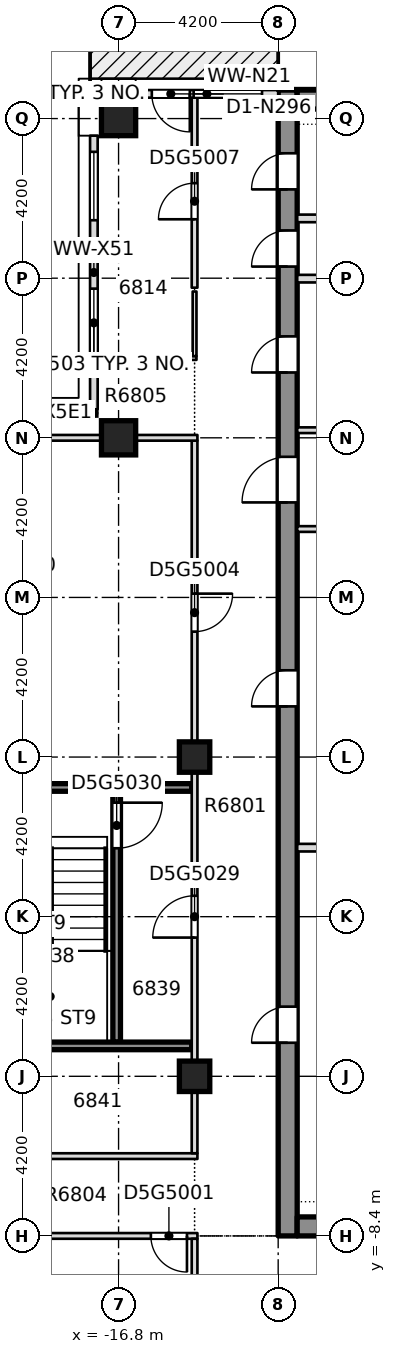
"""IFC4 building model, lengths in metres.
Left out: names, types, materials, properties, quantities, classifications, styles, units other than length and angle.
Written with IfcOpenShell. Run it as: python <this file> out.ifc"""

import sys

from ifc_helpers import new_model, si_unit, direction, frame, frame_2d, origin, origin_2d, place, context, subcontext, project, spatial, rectangle, extrude, element, fill, save


model = new_model("IFC4")
c1 = context("Model", 3, precision=1e-05, world=origin(), true_north=direction((0.0, 1.0)))
c2 = subcontext(c1, "Body", "Model", "MODEL_VIEW")
j1 = project(units=[si_unit("LENGTHUNIT", "METRE"), si_unit("PLANEANGLEUNIT", "RADIAN")], contexts=[c1])
p1 = place(None, origin())
s1 = spatial("IfcSite", under=j1, at=p1, CompositionType="ELEMENT")
p2 = place(p1, origin())
s2 = spatial("IfcBuilding", under=s1, at=p2, CompositionType="ELEMENT")
p3 = place(p2, frame((0.0, 0.0, 257.95)))
s3 = spatial("IfcBuildingStorey", under=s2, at=p3, CompositionType="ELEMENT", Elevation=257.95)
p4 = place(p3, frame((-12.35, -8.4, -0.4), z_axis=(0.0, 0.0, 1.0), x_axis=(0.0, 1.0, 0.0)))
e1 = element("IfcWall", 1, at=p4, inside=s3, PredefinedType="SHEAR", context=c2, shape_type="SweptSolid", body=[
    extrude(rectangle(XDim=30.15, YDim=0.5, at=frame_2d((15.075, 0.0))), origin(), (0.0, 0.0, 1.0), 3.45),
])
p5 = place(p4, frame((5.083, 0.0, 0.4)))
e2 = element("IfcOpeningElement", 2, at=p5, cuts=e1, PredefinedType="OPENING", context=c2, shape_type="SweptSolid", body=[
    extrude(rectangle(XDim=0.95, YDim=2.1, at=frame_2d((0.475, 1.05))), frame((0.0, 0.26, 0.0), z_axis=(0.0, -1.0, 0.0), x_axis=(1.0, 0.0, 0.0)), (0.0, 0.0, 1.0), 0.52),
])
p6 = place(p4, frame((13.933, 0.0, 0.4)))
e3 = element("IfcOpeningElement", 3, at=p6, cuts=e1, PredefinedType="OPENING", context=c2, shape_type="SweptSolid", body=[
    extrude(rectangle(XDim=0.95, YDim=2.1, at=frame_2d((0.475, 1.05))), frame((0.0, 0.26, 0.0), z_axis=(0.0, -1.0, 0.0), x_axis=(1.0, 0.0, 0.0)), (0.0, 0.0, 1.0), 0.52),
])
p7 = place(p4, frame((22.719, 0.0, 0.4)))
e4 = element("IfcOpeningElement", 4, at=p7, cuts=e1, PredefinedType="OPENING", context=c2, shape_type="SweptSolid", body=[
    extrude(rectangle(XDim=0.95, YDim=2.1, at=frame_2d((0.475, 1.05))), frame((0.0, 0.26, 0.0), z_axis=(0.0, -1.0, 0.0), x_axis=(1.0, 0.0, 0.0)), (0.0, 0.0, 1.0), 0.52),
])
p8 = place(p4, frame((25.506, 0.0, 0.4)))
e5 = element("IfcOpeningElement", 5, at=p8, cuts=e1, PredefinedType="OPENING", context=c2, shape_type="SweptSolid", body=[
    extrude(rectangle(XDim=0.95, YDim=2.1, at=frame_2d((0.475, 1.05))), frame((0.0, 0.26, 0.0), z_axis=(0.0, -1.0, 0.0), x_axis=(1.0, 0.0, 0.0)), (0.0, 0.0, 1.0), 0.52),
])
p9 = place(p4, frame((27.537, 0.0, 0.4)))
e6 = element("IfcOpeningElement", 6, at=p9, cuts=e1, PredefinedType="OPENING", context=c2, shape_type="SweptSolid", body=[
    extrude(rectangle(XDim=0.95, YDim=2.1, at=frame_2d((0.475, 1.05))), frame((0.0, 0.26, 0.0), z_axis=(0.0, -1.0, 0.0), x_axis=(1.0, 0.0, 0.0)), (0.0, 0.0, 1.0), 0.52),
])
p10 = place(p4, frame((19.3, 0.0, 0.4)))
e7 = element("IfcOpeningElement", 7, at=p10, cuts=e1, PredefinedType="OPENING", context=c2, shape_type="SweptSolid", body=[
    extrude(rectangle(XDim=1.2, YDim=2.1, at=frame_2d((0.6, 1.05))), frame((0.0, 0.26, 0.0), z_axis=(0.0, -1.0, 0.0), x_axis=(1.0, 0.0, 0.0)), (0.0, 0.0, 1.0), 0.52),
])
p11 = place(p3, frame((-12.1, -8.15, -0.4), z_axis=(0.0, 0.0, 1.0), x_axis=(1.0, 0.0, 0.0)))
e8 = element("IfcWall", 8, at=p11, inside=s3, PredefinedType="SHEAR", context=c2, shape_type="SweptSolid", body=[
    extrude(rectangle(XDim=24.2, YDim=0.5, at=frame_2d((12.1, 0.0))), origin(), (0.0, 0.0, 1.0), 3.45),
])
p12 = place(p11, frame((7.35, 0.0, 0.4)))
e9 = element("IfcOpeningElement", 9, at=p12, cuts=e8, PredefinedType="OPENING", context=c2, shape_type="SweptSolid", body=[
    extrude(rectangle(XDim=1.8, YDim=2.1, at=frame_2d((0.9, 1.05))), frame((0.0, 0.26, 0.0), z_axis=(0.0, -1.0, 0.0), x_axis=(1.0, 0.0, 0.0)), (0.0, 0.0, 1.0), 0.52),
])
p13 = place(p11, frame((15.05, 0.0, 0.4)))
e10 = element("IfcOpeningElement", 10, at=p13, cuts=e8, PredefinedType="OPENING", context=c2, shape_type="SweptSolid", body=[
    extrude(rectangle(XDim=1.8, YDim=2.1, at=frame_2d((0.9, 1.05))), frame((0.0, 0.26, 0.0), z_axis=(0.0, -1.0, 0.0), x_axis=(1.0, 0.0, 0.0)), (0.0, 0.0, 1.0), 0.52),
])
p14 = place(p3, frame((-12.1, 21.5, -0.4), z_axis=(0.0, 0.0, 1.0), x_axis=(1.0, 0.0, 0.0)))
e11 = element("IfcWall", 11, at=p14, inside=s3, PredefinedType="SHEAR", context=c2, shape_type="SweptSolid", body=[
    extrude(rectangle(XDim=24.2, YDim=0.5, at=frame_2d((12.1, 0.0))), origin(), (0.0, 0.0, 1.0), 3.45),
])
for number, where, z_axis, x_axis in (
    (12, (-16.8, 12.6, -0.4), (0.0, 0.0, 1.0), (1.0, 0.0, 0.0)),
    (13, (-16.8, 21.0, -0.4), (0.0, 0.0, 1.0), (1.0, 0.0, 0.0)),
):
    element("IfcColumn", number, at=place(p3, frame(where, z_axis=z_axis, x_axis=x_axis)), inside=s3, PredefinedType="COLUMN", context=c2, shape_type="SweptSolid", body=[
        extrude(rectangle(XDim=0.9, YDim=0.9, at=origin_2d()), origin(), (0.0, 0.0, 1.0), 3.45),
    ])
for number, where, z_axis, x_axis in (
    (14, (-14.8, -4.2, -0.4), (0.0, 0.0, 1.0), (1.0, 0.0, 0.0)),
    (15, (-14.8, 4.2, -0.4), (0.0, 0.0, 1.0), (1.0, 0.0, 0.0)),
):
    element("IfcColumn", number, at=place(p3, frame(where, z_axis=z_axis, x_axis=x_axis)), inside=s3, PredefinedType="COLUMN", context=c2, shape_type="SweptSolid", body=[
        extrude(rectangle(XDim=0.8, YDim=0.8, at=origin_2d()), origin(), (0.0, 0.0, 1.0), 3.45),
    ])
p15 = place(p3, frame((-25.75, -8.4, 0.0), z_axis=(0.0, 0.0, 1.0), x_axis=(1.0, 0.0, 0.0)))
e16 = element("IfcWall", 16, at=p15, inside=s3, PredefinedType="PARTITIONING", context=c2, shape_type="SweptSolid", body=[
    extrude(rectangle(XDim=11.025, YDim=0.15, at=frame_2d((5.512, 0.0))), origin(), (0.0, 0.0, 1.0), 3.05),
])
p16 = place(p15, frame((9.8, 0.0, 0.0)))
e17 = element("IfcOpeningElement", 17, at=p16, cuts=e16, PredefinedType="OPENING", context=c2, shape_type="SweptSolid", body=[
    extrude(rectangle(XDim=0.95, YDim=2.1, at=frame_2d((0.475, 1.05))), frame((0.0, 0.085, 0.0), z_axis=(0.0, -1.0, 0.0), x_axis=(1.0, 0.0, 0.0)), (0.0, 0.0, 1.0), 0.17),
])
p17 = place(p3, frame((-25.75, -6.3, 0.0), z_axis=(0.0, 0.0, 1.0), x_axis=(1.0, 0.0, 0.0)))
e18 = element("IfcWall", 18, at=p17, inside=s3, PredefinedType="PARTITIONING", context=c2, shape_type="SweptSolid", body=[
    extrude(rectangle(XDim=11.025, YDim=0.15, at=frame_2d((5.512, 0.0))), origin(), (0.0, 0.0, 1.0), 3.05),
])
p18 = place(p17, frame((4.875, 0.0, 0.0)))
e19 = element("IfcOpeningElement", 19, at=p18, cuts=e18, PredefinedType="OPENING", context=c2, shape_type="SweptSolid", body=[
    extrude(rectangle(XDim=1.0, YDim=2.1, at=frame_2d((0.5, 1.05))), frame((0.0, 0.085, 0.0), z_axis=(0.0, -1.0, 0.0), x_axis=(1.0, 0.0, 0.0)), (0.0, 0.0, 1.0), 0.17),
])
p19 = place(p3, frame((-20.45, 3.4, 0.0), z_axis=(0.0, 0.0, 1.0), x_axis=(1.0, 0.0, 0.0)))
e20 = element("IfcWall", 20, at=p19, inside=s3, PredefinedType="SOLIDWALL", context=c2, shape_type="SweptSolid", body=[
    extrude(rectangle(XDim=5.575, YDim=0.2, at=frame_2d((2.788, 0.0))), origin(), (0.0, 0.0, 1.0), 3.05),
])
p20 = place(p3, frame((-17.35, 14.7, 0.0), z_axis=(0.0, 0.0, 1.0), x_axis=(1.0, 0.0, 0.0)))
e21 = element("IfcWall", 21, at=p20, inside=s3, PredefinedType="PARTITIONING", context=c2, shape_type="SweptSolid", body=[
    extrude(rectangle(XDim=0.2, YDim=0.15, at=frame_2d((0.1, 0.0))), origin(), (0.0, 0.0, 1.0), 3.05),
])
p21 = place(p3, frame((-17.25, 14.7, 0.0), z_axis=(0.0, 0.0, 1.0), x_axis=(1.0, 0.0, 0.0)))
e22 = element("IfcWall", 22, at=p21, inside=s3, PredefinedType="PARTITIONING", context=c2, shape_type="SweptSolid", body=[
    extrude(rectangle(XDim=2.5, YDim=0.1, at=frame_2d((1.25, 0.0))), origin(), (0.0, 0.0, 1.0), 3.05),
])
p22 = place(p3, frame((-16.85, -3.3, 0.0), z_axis=(0.0, 0.0, 1.0), x_axis=(0.0, 1.0, 0.0)))
e23 = element("IfcWall", 23, at=p22, inside=s3, PredefinedType="SOLIDWALL", context=c2, shape_type="SweptSolid", body=[
    extrude(rectangle(XDim=6.6, YDim=0.2, at=frame_2d((3.3, 0.0))), origin(), (0.0, 0.0, 1.0), 3.05),
])
p23 = place(p22, frame((5.1, 0.0, 0.0)))
e24 = element("IfcOpeningElement", 24, at=p23, cuts=e23, PredefinedType="OPENING", context=c2, shape_type="SweptSolid", body=[
    extrude(rectangle(XDim=1.2, YDim=2.1, at=frame_2d((0.6, 1.05))), frame((0.0, 0.11, 0.0), z_axis=(0.0, -1.0, 0.0), x_axis=(1.0, 0.0, 0.0)), (0.0, 0.0, 1.0), 0.22),
])
p24 = place(p3, frame((-14.8, -10.38, 0.0), z_axis=(0.0, 0.0, 1.0), x_axis=(0.0, 1.0, 0.0)))
e25 = element("IfcWall", 25, at=p24, inside=s3, PredefinedType="PARTITIONING", context=c2, shape_type="SweptSolid", body=[
    extrude(rectangle(XDim=1.905, YDim=0.15, at=frame_2d((0.952, 0.0))), origin(), (0.0, 0.0, 1.0), 3.05),
])
p25 = place(p3, frame((-14.8, -6.225, 0.0), z_axis=(0.0, 0.0, 1.0), x_axis=(0.0, 1.0, 0.0)))
e26 = element("IfcWall", 26, at=p25, inside=s3, PredefinedType="PARTITIONING", context=c2, shape_type="SweptSolid", body=[
    extrude(rectangle(XDim=18.75, YDim=0.15, at=frame_2d((9.375, 0.0))), origin(), (0.0, 0.0, 1.0), 3.05),
])
p26 = place(p25, frame((13.725, 0.0, 0.0)))
e27 = element("IfcOpeningElement", 27, at=p26, cuts=e26, PredefinedType="OPENING", context=c2, shape_type="SweptSolid", body=[
    extrude(rectangle(XDim=1.0, YDim=2.1, at=frame_2d((0.5, 1.05))), frame((0.0, 0.085, 0.0), z_axis=(0.0, -1.0, 0.0), x_axis=(1.0, 0.0, 0.0)), (0.0, 0.0, 1.0), 0.17),
])
p27 = place(p25, frame((5.675, 0.0, 0.0)))
e28 = element("IfcOpeningElement", 28, at=p27, cuts=e26, PredefinedType="OPENING", context=c2, shape_type="SweptSolid", body=[
    extrude(rectangle(XDim=1.1, YDim=2.1, at=frame_2d((0.55, 1.05))), frame((0.0, 0.085, 0.0), z_axis=(0.0, -1.0, 0.0), x_axis=(1.0, 0.0, 0.0)), (0.0, 0.0, 1.0), 0.17),
])
p28 = place(p3, frame((-14.8, 14.75, 0.0), z_axis=(0.0, 0.0, 1.0), x_axis=(0.0, 1.0, 0.0)))
e29 = element("IfcWall", 29, at=p28, inside=s3, PredefinedType="PARTITIONING", context=c2, shape_type="SweptSolid", body=[
    extrude(rectangle(XDim=1.7, YDim=0.1, at=frame_2d((0.85, 0.0))), origin(), (0.0, 0.0, 1.0), 3.05),
])
p29 = place(p3, frame((-14.8, 16.55, 0.0), z_axis=(0.0, 0.0, 1.0), x_axis=(0.0, 1.0, 0.0)))
e30 = element("IfcWall", 30, at=p29, inside=s3, PredefinedType="PARTITIONING", context=c2, shape_type="SweptSolid", body=[
    extrude(rectangle(XDim=5.0, YDim=0.15, at=frame_2d((2.5, 0.0))), origin(), (0.0, 0.0, 1.0), 3.05),
])
p30 = place(p29, frame((1.8, 0.0, 0.0)))
e31 = element("IfcOpeningElement", 31, at=p30, cuts=e30, PredefinedType="OPENING", context=c2, shape_type="SweptSolid", body=[
    extrude(rectangle(XDim=0.95, YDim=2.1, at=frame_2d((0.475, 1.05))), frame((0.0, 0.085, 0.0), z_axis=(0.0, -1.0, 0.0), x_axis=(1.0, 0.0, 0.0)), (0.0, 0.0, 1.0), 0.17),
])
p31 = place(p3, frame((-12.6, 21.65, 0.0), z_axis=(0.0, 0.0, 1.0), x_axis=(-1.0, 0.0, 0.0)))
e32 = element("IfcWall", 32, at=p31, inside=s3, PredefinedType="STANDARD", context=c2, shape_type="SweptSolid", body=[
    extrude(rectangle(XDim=3.75, YDim=0.2, at=frame_2d((1.875, 0.0))), origin(), (0.0, 0.0, 1.0), 3.05),
])
p32 = place(p31, frame((0.425, 0.0, 0.2)))
e33 = element("IfcOpeningElement", 33, at=p32, cuts=e32, PredefinedType="OPENING", context=c2, shape_type="SweptSolid", body=[
    extrude(rectangle(XDim=1.8, YDim=2.65, at=frame_2d((0.9, 1.325))), frame((0.0, 0.11, 0.0), z_axis=(0.0, -1.0, 0.0), x_axis=(1.0, 0.0, 0.0)), (0.0, 0.0, 1.0), 0.22),
])
p33 = place(p31, frame((2.325, 0.0, 0.0)))
e34 = element("IfcOpeningElement", 34, at=p33, cuts=e32, PredefinedType="OPENING", context=c2, shape_type="SweptSolid", body=[
    extrude(rectangle(XDim=1.0, YDim=2.4, at=frame_2d((0.5, 1.2))), frame((0.0, 0.11, 0.0), z_axis=(0.0, -1.0, 0.0), x_axis=(1.0, 0.0, 0.0)), (0.0, 0.0, 1.0), 0.22),
])
p34 = place(p3, frame((-17.45, 20.55, 0.0), z_axis=(0.0, 0.0, 1.0), x_axis=(0.0, -1.0, 0.0)))
e35 = element("IfcWall", 35, at=p34, inside=s3, PredefinedType="STANDARD", context=c2, shape_type="SweptSolid", body=[
    extrude(rectangle(XDim=7.2, YDim=0.2, at=frame_2d((3.6, 0.0))), origin(), (0.0, 0.0, 1.0), 3.05),
])
p35 = place(p34, frame((4.025, 0.0, 0.2)))
e36 = element("IfcOpeningElement", 36, at=p35, cuts=e35, PredefinedType="OPENING", context=c2, shape_type="SweptSolid", body=[
    extrude(rectangle(XDim=1.8, YDim=2.65, at=frame_2d((0.9, 1.325))), frame((0.0, 0.11, 0.0), z_axis=(0.0, -1.0, 0.0), x_axis=(1.0, 0.0, 0.0)), (0.0, 0.0, 1.0), 0.22),
])
p36 = place(p34, frame((0.425, 0.0, 0.2)))
e37 = element("IfcOpeningElement", 37, at=p36, cuts=e35, PredefinedType="OPENING", context=c2, shape_type="SweptSolid", body=[
    extrude(rectangle(XDim=1.8, YDim=2.65, at=frame_2d((0.9, 1.325))), frame((0.0, 0.11, 0.0), z_axis=(0.0, -1.0, 0.0), x_axis=(1.0, 0.0, 0.0)), (0.0, 0.0, 1.0), 0.22),
])
p37 = place(p3, frame((-17.55, 13.25, 0.0), z_axis=(0.0, 0.0, 1.0), x_axis=(-1.0, 0.0, 0.0)))
e38 = element("IfcWall", 38, at=p37, inside=s3, PredefinedType="STANDARD", context=c2, shape_type="SweptSolid", body=[
    extrude(rectangle(XDim=7.2, YDim=0.2, at=frame_2d((3.6, 0.0))), origin(), (0.0, 0.0, 1.0), 3.05),
])
p38 = place(p3, frame((-12.099, 1.816, 0.0), z_axis=(0.0, 0.0, 1.0), x_axis=(1.0, 0.0, 0.0)))
e39 = element("IfcWall", 39, at=p38, inside=s3, PredefinedType="PARTITIONING", context=c2, shape_type="SweptSolid", body=[
    extrude(rectangle(XDim=3.448, YDim=0.2, at=frame_2d((1.724, 0.0))), origin(), (0.0, 0.0, 1.0), 3.05),
])
for number, where, z_axis, x_axis in (
    (40, (-12.099, 10.2, 0.0), (0.0, 0.0, 1.0), (1.0, 0.0, 0.0)),
    (41, (-12.099, 12.8, 0.0), (0.0, 0.0, 1.0), (1.0, 0.0, 0.0)),
):
    element("IfcWall", number, at=place(p3, frame(where, z_axis=z_axis, x_axis=x_axis)), inside=s3, PredefinedType="PARTITIONING", context=c2, shape_type="SweptSolid", body=[
        extrude(rectangle(XDim=3.448, YDim=0.15, at=frame_2d((1.724, 0.0))), origin(), (0.0, 0.0, 1.0), 3.05),
    ])
for number, where, z_axis, x_axis in (
    (42, (-12.099, 16.788, 0.0), (0.0, 0.0, 1.0), (1.0, 0.0, 0.0)),
    (43, (-12.099, 18.373, 0.0), (0.0, 0.0, 1.0), (1.0, 0.0, 0.0)),
):
    element("IfcWall", number, at=place(p3, frame(where, z_axis=z_axis, x_axis=x_axis)), inside=s3, PredefinedType="PARTITIONING", context=c2, shape_type="SweptSolid", body=[
        extrude(rectangle(XDim=3.448, YDim=0.2, at=frame_2d((1.724, 0.0))), origin(), (0.0, 0.0, 1.0), 3.05),
    ])
p39 = place(p3, frame((-22.4, -3.4, 0.0), z_axis=(0.0, 0.0, 1.0), x_axis=(1.0, 0.0, 0.0)))
e44 = element("IfcWall", 44, at=p39, inside=s3, PredefinedType="SOLIDWALL", context=c2, shape_type="SweptSolid", body=[
    extrude(rectangle(XDim=7.525, YDim=0.2, at=frame_2d((3.762, 0.0))), origin(), (0.0, 0.0, 1.0), 3.05),
])
p40 = place(p3, frame((-24.75, 12.6, 0.0), z_axis=(0.0, 0.0, 1.0), x_axis=(1.0, 0.0, 0.0)))
e45 = element("IfcWall", 45, at=p40, inside=s3, PredefinedType="PARTITIONING", context=c2, shape_type="SweptSolid", body=[
    extrude(rectangle(XDim=7.5, YDim=0.15, at=frame_2d((3.75, 0.0))), origin(), (0.0, 0.0, 1.0), 2.5),
])
p41 = place(p3, frame((-17.25, 12.6, 0.0), z_axis=(0.0, 0.0, 1.0), x_axis=(1.0, 0.0, 0.0)))
e46 = element("IfcWall", 46, at=p41, inside=s3, PredefinedType="PARTITIONING", context=c2, shape_type="SweptSolid", body=[
    extrude(rectangle(XDim=2.525, YDim=0.15, at=frame_2d((1.262, 0.0))), origin(), (0.0, 0.0, 1.0), 3.05),
])
p42 = place(p16, origin())
e47 = element("IfcDoor", 47, at=p42, inside=s3, OperationType="SINGLE_SWING_RIGHT", PredefinedType="DOOR", context=c2, shape_type="SweptSolid", body=[
    extrude(rectangle(XDim=0.95, YDim=2.1, at=frame_2d((0.475, 1.05))), frame((0.0, 0.025, 0.0), z_axis=(0.0, -1.0, 0.0), x_axis=(1.0, 0.0, 0.0)), (0.0, 0.0, 1.0), 0.05),
])
fill(e17, e47)
p43 = place(p26, origin())
e48 = element("IfcDoor", 48, at=p43, inside=s3, OperationType="SINGLE_SWING_LEFT", PredefinedType="DOOR", context=c2, shape_type="SweptSolid", body=[
    extrude(rectangle(XDim=1.0, YDim=2.1, at=frame_2d((0.5, 1.05))), frame((0.0, 0.025, 0.0), z_axis=(0.0, -1.0, 0.0), x_axis=(1.0, 0.0, 0.0)), (0.0, 0.0, 1.0), 0.05),
])
fill(e27, e48)
p44 = place(p30, origin())
e49 = element("IfcDoor", 49, at=p44, inside=s3, OperationType="SINGLE_SWING_RIGHT", PredefinedType="DOOR", context=c2, shape_type="SweptSolid", body=[
    extrude(rectangle(XDim=0.95, YDim=2.1, at=frame_2d((0.475, 1.05))), frame((0.0, 0.025, 0.0), z_axis=(0.0, -1.0, 0.0), x_axis=(1.0, 0.0, 0.0)), (0.0, 0.0, 1.0), 0.05),
])
fill(e31, e49)
p45 = place(p27, origin())
e50 = element("IfcDoor", 50, at=p45, inside=s3, OperationType="SINGLE_SWING_RIGHT", PredefinedType="DOOR", context=c2, shape_type="SweptSolid", body=[
    extrude(rectangle(XDim=1.1, YDim=2.1, at=frame_2d((0.55, 1.05))), frame((0.0, 0.025, 0.0), z_axis=(0.0, -1.0, 0.0), x_axis=(1.0, 0.0, 0.0)), (0.0, 0.0, 1.0), 0.05),
])
fill(e28, e50)
p46 = place(p23, origin())
e51 = element("IfcDoor", 51, at=p46, inside=s3, OperationType="SINGLE_SWING_RIGHT", PredefinedType="DOOR", context=c2, shape_type="SweptSolid", body=[
    extrude(rectangle(XDim=1.2, YDim=2.1, at=frame_2d((0.6, 1.05))), frame((0.0, 0.025, 0.0), z_axis=(0.0, -1.0, 0.0), x_axis=(1.0, 0.0, 0.0)), (0.0, 0.0, 1.0), 0.05),
])
fill(e24, e51)
p47 = place(p32, origin())
e52 = element("IfcWindow", 52, at=p47, inside=s3, PartitioningType="SINGLE_PANEL", PredefinedType="WINDOW", context=c2, shape_type="SweptSolid", body=[
    extrude(rectangle(XDim=1.8, YDim=2.65, at=frame_2d((0.9, 1.325))), frame((0.0, 0.03, 0.0), z_axis=(0.0, -1.0, 0.0), x_axis=(1.0, 0.0, 0.0)), (0.0, 0.0, 1.0), 0.06),
])
fill(e33, e52)
p48 = place(p33, origin())
e53 = element("IfcDoor", 53, at=p48, inside=s3, OperationType="SINGLE_SWING_LEFT", PredefinedType="DOOR", context=c2, shape_type="SweptSolid", body=[
    extrude(rectangle(XDim=1.0, YDim=2.4, at=frame_2d((0.5, 1.2))), frame((0.0, 0.025, 0.0), z_axis=(0.0, -1.0, 0.0), x_axis=(1.0, 0.0, 0.0)), (0.0, 0.0, 1.0), 0.05),
])
fill(e34, e53)
p49 = place(p35, origin())
e54 = element("IfcWindow", 54, at=p49, inside=s3, PartitioningType="SINGLE_PANEL", PredefinedType="WINDOW", context=c2, shape_type="SweptSolid", body=[
    extrude(rectangle(XDim=1.8, YDim=2.65, at=frame_2d((0.9, 1.325))), frame((0.0, 0.03, 0.0), z_axis=(0.0, -1.0, 0.0), x_axis=(1.0, 0.0, 0.0)), (0.0, 0.0, 1.0), 0.06),
])
fill(e36, e54)
p50 = place(p36, origin())
e55 = element("IfcWindow", 55, at=p50, inside=s3, PartitioningType="SINGLE_PANEL", PredefinedType="WINDOW", context=c2, shape_type="SweptSolid", body=[
    extrude(rectangle(XDim=1.8, YDim=2.65, at=frame_2d((0.9, 1.325))), frame((0.0, 0.03, 0.0), z_axis=(0.0, -1.0, 0.0), x_axis=(1.0, 0.0, 0.0)), (0.0, 0.0, 1.0), 0.06),
])
fill(e37, e55)
p51 = place(p5, origin())
e56 = element("IfcDoor", 56, at=p51, inside=s3, OperationType="SINGLE_SWING_LEFT", PredefinedType="DOOR", context=c2, shape_type="SweptSolid", body=[
    extrude(rectangle(XDim=0.95, YDim=2.1, at=frame_2d((0.475, 1.05))), frame((0.0, 0.025, 0.0), z_axis=(0.0, -1.0, 0.0), x_axis=(1.0, 0.0, 0.0)), (0.0, 0.0, 1.0), 0.05),
])
fill(e2, e56)
p52 = place(p6, origin())
e57 = element("IfcDoor", 57, at=p52, inside=s3, OperationType="SINGLE_SWING_LEFT", PredefinedType="DOOR", context=c2, shape_type="SweptSolid", body=[
    extrude(rectangle(XDim=0.95, YDim=2.1, at=frame_2d((0.475, 1.05))), frame((0.0, 0.025, 0.0), z_axis=(0.0, -1.0, 0.0), x_axis=(1.0, 0.0, 0.0)), (0.0, 0.0, 1.0), 0.05),
])
fill(e3, e57)
p53 = place(p7, origin())
e58 = element("IfcDoor", 58, at=p53, inside=s3, OperationType="SINGLE_SWING_LEFT", PredefinedType="DOOR", context=c2, shape_type="SweptSolid", body=[
    extrude(rectangle(XDim=0.95, YDim=2.1, at=frame_2d((0.475, 1.05))), frame((0.0, 0.025, 0.0), z_axis=(0.0, -1.0, 0.0), x_axis=(1.0, 0.0, 0.0)), (0.0, 0.0, 1.0), 0.05),
])
fill(e4, e58)
p54 = place(p8, origin())
e59 = element("IfcDoor", 59, at=p54, inside=s3, OperationType="SINGLE_SWING_LEFT", PredefinedType="DOOR", context=c2, shape_type="SweptSolid", body=[
    extrude(rectangle(XDim=0.95, YDim=2.1, at=frame_2d((0.475, 1.05))), frame((0.0, 0.025, 0.0), z_axis=(0.0, -1.0, 0.0), x_axis=(1.0, 0.0, 0.0)), (0.0, 0.0, 1.0), 0.05),
])
fill(e5, e59)
p55 = place(p9, origin())
e60 = element("IfcDoor", 60, at=p55, inside=s3, OperationType="SINGLE_SWING_LEFT", PredefinedType="DOOR", context=c2, shape_type="SweptSolid", body=[
    extrude(rectangle(XDim=0.95, YDim=2.1, at=frame_2d((0.475, 1.05))), frame((0.0, 0.025, 0.0), z_axis=(0.0, -1.0, 0.0), x_axis=(1.0, 0.0, 0.0)), (0.0, 0.0, 1.0), 0.05),
])
fill(e6, e60)
p56 = place(p10, origin())
e61 = element("IfcDoor", 61, at=p56, inside=s3, OperationType="SINGLE_SWING_LEFT", PredefinedType="DOOR", context=c2, shape_type="SweptSolid", body=[
    extrude(rectangle(XDim=1.2, YDim=2.1, at=frame_2d((0.6, 1.05))), frame((0.0, 0.025, 0.0), z_axis=(0.0, -1.0, 0.0), x_axis=(1.0, 0.0, 0.0)), (0.0, 0.0, 1.0), 0.05),
])
fill(e7, e61)
save(model, sys.argv[1])
